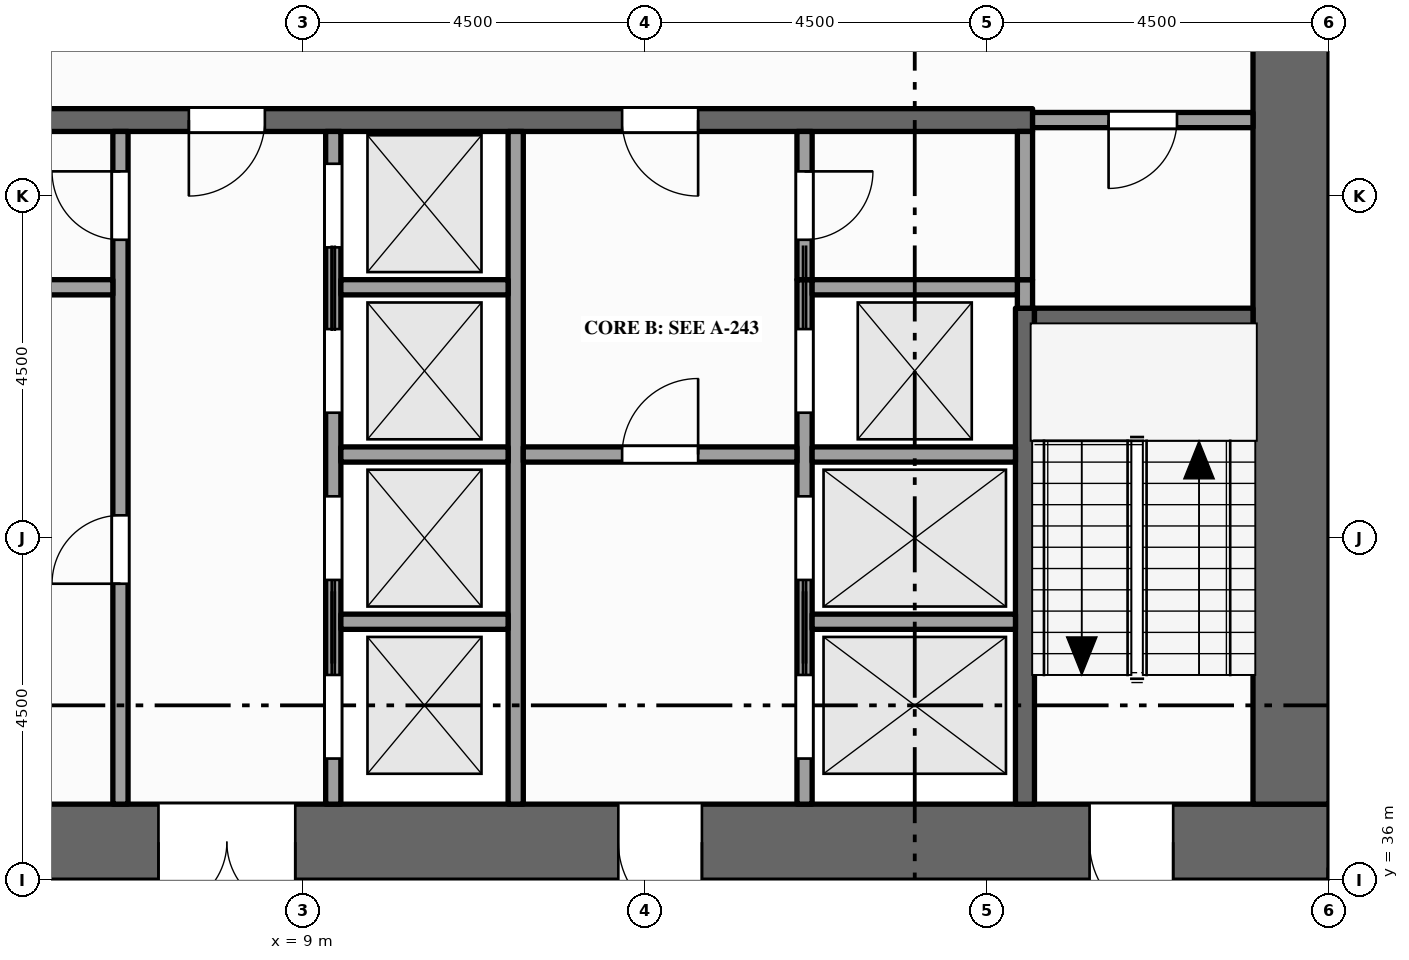
"""IFC4 building model, lengths in metres.
Left out: names, types, materials, properties, quantities, classifications, styles, units other than length and angle.
Written with IfcOpenShell. Run it as: python <this file> out.ifc"""

import sys

from ifc_helpers import new_model, si_unit, direction, frame, frame_2d, origin, place, context, subcontext, project, spatial, rectangle, extrude, element, fill, save


model = new_model("IFC4")
c1 = context("Model", 3, precision=1e-05, world=origin(), true_north=direction((0.0, 1.0)))
c2 = subcontext(c1, "Body", "Model", "MODEL_VIEW")
j1 = project(units=[si_unit("LENGTHUNIT", "METRE"), si_unit("PLANEANGLEUNIT", "RADIAN")], contexts=[c1])
p1 = place(None, origin())
s1 = spatial("IfcSite", under=j1, at=p1, CompositionType="ELEMENT")
p2 = place(p1, origin())
s2 = spatial("IfcBuilding", under=s1, at=p2, CompositionType="ELEMENT")
p3 = place(p2, frame((0.0, 0.0, 239.0)))
s3 = spatial("IfcBuildingStorey", under=s2, at=p3, CompositionType="ELEMENT", Elevation=239.0)
p4 = place(p3, frame((0.0, 36.5, -0.15), z_axis=(0.0, 0.0, 1.0), x_axis=(1.0, 0.0, 0.0)))
e1 = element("IfcWall", 1, at=p4, inside=s3, PredefinedType="SHEAR", context=c2, shape_type="SweptSolid", body=[
    extrude(rectangle(XDim=22.5, YDim=1.0, at=frame_2d((11.25, 0.0))), origin(), (0.0, 0.0, 1.0), 4.0),
])
p5 = place(p4, frame((7.1, 0.0, 0.15)))
e2 = element("IfcOpeningElement", 2, at=p5, cuts=e1, PredefinedType="OPENING", context=c2, shape_type="SweptSolid", body=[
    extrude(rectangle(XDim=1.8, YDim=2.1, at=frame_2d((0.9, 1.05))), frame((0.0, 0.51, 0.0), z_axis=(0.0, -1.0, 0.0), x_axis=(1.0, 0.0, 0.0)), (0.0, 0.0, 1.0), 1.02),
])
p6 = place(p4, frame((13.15, 0.0, 0.15)))
e3 = element("IfcOpeningElement", 3, at=p6, cuts=e1, PredefinedType="OPENING", context=c2, shape_type="SweptSolid", body=[
    extrude(rectangle(XDim=1.1, YDim=2.1, at=frame_2d((0.55, 1.05))), frame((0.0, 0.51, 0.0), z_axis=(0.0, -1.0, 0.0), x_axis=(1.0, 0.0, 0.0)), (0.0, 0.0, 1.0), 1.02),
])
p7 = place(p4, frame((2.15, 0.0, 0.15)))
e4 = element("IfcOpeningElement", 4, at=p7, cuts=e1, PredefinedType="OPENING", context=c2, shape_type="SweptSolid", body=[
    extrude(rectangle(XDim=1.1, YDim=2.1, at=frame_2d((0.55, 1.05))), frame((0.0, 0.51, 0.0), z_axis=(0.0, -1.0, 0.0), x_axis=(1.0, 0.0, 0.0)), (0.0, 0.0, 1.0), 1.02),
])
p8 = place(p4, frame((19.35, 0.0, 0.15)))
e5 = element("IfcOpeningElement", 5, at=p8, cuts=e1, PredefinedType="OPENING", context=c2, shape_type="SweptSolid", body=[
    extrude(rectangle(XDim=1.1, YDim=2.1, at=frame_2d((0.55, 1.05))), frame((0.0, 0.51, 0.0), z_axis=(0.0, -1.0, 0.0), x_axis=(1.0, 0.0, 0.0)), (0.0, 0.0, 1.0), 1.02),
])
p9 = place(p3, frame((22.0, 37.0, -0.15), z_axis=(0.0, 0.0, 1.0), x_axis=(0.0, 1.0, 0.0)))
e6 = element("IfcWall", 6, at=p9, inside=s3, PredefinedType="SHEAR", context=c2, shape_type="SweptSolid", body=[
    extrude(rectangle(XDim=11.5, YDim=1.0, at=frame_2d((5.75, 0.0))), origin(), (0.0, 0.0, 1.0), 4.0),
])
p10 = place(p3, frame((6.6, 37.0, 0.0), z_axis=(0.0, 0.0, 1.0), x_axis=(0.0, 1.0, 0.0)))
e7 = element("IfcWall", 7, at=p10, inside=s3, PredefinedType="PARTITIONING", context=c2, shape_type="SweptSolid", body=[
    extrude(rectangle(XDim=8.85, YDim=0.2, at=frame_2d((4.425, 0.0))), origin(), (0.0, 0.0, 1.0), 3.7),
])
p11 = place(p10, frame((2.9, 0.0, 0.0)))
e8 = element("IfcOpeningElement", 8, at=p11, cuts=e7, PredefinedType="OPENING", context=c2, shape_type="SweptSolid", body=[
    extrude(rectangle(XDim=0.9, YDim=2.1, at=frame_2d((0.45, 1.05))), frame((0.0, 0.11, 0.0), z_axis=(0.0, -1.0, 0.0), x_axis=(1.0, 0.0, 0.0)), (0.0, 0.0, 1.0), 0.22),
])
p12 = place(p10, frame((7.425, 0.0, 0.0)))
e9 = element("IfcOpeningElement", 9, at=p12, cuts=e7, PredefinedType="OPENING", context=c2, shape_type="SweptSolid", body=[
    extrude(rectangle(XDim=0.9, YDim=2.1, at=frame_2d((0.45, 1.05))), frame((0.0, 0.11, 0.0), z_axis=(0.0, -1.0, 0.0), x_axis=(1.0, 0.0, 0.0)), (0.0, 0.0, 1.0), 0.22),
])
p13 = place(p3, frame((9.4, 37.0, 0.0), z_axis=(0.0, 0.0, 1.0), x_axis=(0.0, 1.0, 0.0)))
e10 = element("IfcWall", 10, at=p13, inside=s3, PredefinedType="SOLIDWALL", context=c2, shape_type="SweptSolid", body=[
    extrude(rectangle(XDim=8.85, YDim=0.2, at=frame_2d((4.425, 0.0))), origin(), (0.0, 0.0, 1.0), 3.7),
])
p14 = place(p13, frame((0.6, 0.0, 0.012)))
e11 = element("IfcOpeningElement", 11, at=p14, cuts=e10, PredefinedType="OPENING", context=c2, shape_type="SweptSolid", body=[
    extrude(rectangle(XDim=1.1, YDim=2.1, at=frame_2d((0.55, 1.05))), frame((0.0, 0.11, 0.0), z_axis=(0.0, -1.0, 0.0), x_axis=(1.0, 0.0, 0.0)), (0.0, 0.0, 1.0), 0.22),
])
p15 = place(p13, frame((2.95, 0.0, 0.012)))
e12 = element("IfcOpeningElement", 12, at=p15, cuts=e10, PredefinedType="OPENING", context=c2, shape_type="SweptSolid", body=[
    extrude(rectangle(XDim=1.1, YDim=2.1, at=frame_2d((0.55, 1.05))), frame((0.0, 0.11, 0.0), z_axis=(0.0, -1.0, 0.0), x_axis=(1.0, 0.0, 0.0)), (0.0, 0.0, 1.0), 0.22),
])
p16 = place(p13, frame((5.15, 0.0, 0.012)))
e13 = element("IfcOpeningElement", 13, at=p16, cuts=e10, PredefinedType="OPENING", context=c2, shape_type="SweptSolid", body=[
    extrude(rectangle(XDim=1.1, YDim=2.1, at=frame_2d((0.55, 1.05))), frame((0.0, 0.11, 0.0), z_axis=(0.0, -1.0, 0.0), x_axis=(1.0, 0.0, 0.0)), (0.0, 0.0, 1.0), 0.22),
])
p17 = place(p13, frame((7.325, 0.0, 0.012)))
e14 = element("IfcOpeningElement", 14, at=p17, cuts=e10, PredefinedType="OPENING", context=c2, shape_type="SweptSolid", body=[
    extrude(rectangle(XDim=1.1, YDim=2.1, at=frame_2d((0.55, 1.05))), frame((0.0, 0.11, 0.0), z_axis=(0.0, -1.0, 0.0), x_axis=(1.0, 0.0, 0.0)), (0.0, 0.0, 1.0), 0.22),
])
p18 = place(p3, frame((11.8, 37.0, 0.0), z_axis=(0.0, 0.0, 1.0), x_axis=(0.0, 1.0, 0.0)))
e15 = element("IfcWall", 15, at=p18, inside=s3, PredefinedType="SOLIDWALL", context=c2, shape_type="SweptSolid", body=[
    extrude(rectangle(XDim=8.85, YDim=0.2, at=frame_2d((4.425, 0.0))), origin(), (0.0, 0.0, 1.0), 3.7),
])
p19 = place(p3, frame((15.6, 37.0, 0.0), z_axis=(0.0, 0.0, 1.0), x_axis=(0.0, 1.0, 0.0)))
e16 = element("IfcWall", 16, at=p19, inside=s3, PredefinedType="SOLIDWALL", context=c2, shape_type="SweptSolid", body=[
    extrude(rectangle(XDim=6.9, YDim=0.2, at=frame_2d((3.45, 0.0))), origin(), (0.0, 0.0, 1.0), 3.7),
])
p20 = place(p19, frame((0.6, 0.0, 0.012)))
e17 = element("IfcOpeningElement", 17, at=p20, cuts=e16, PredefinedType="OPENING", context=c2, shape_type="SweptSolid", body=[
    extrude(rectangle(XDim=1.1, YDim=2.1, at=frame_2d((0.55, 1.05))), frame((0.0, 0.11, 0.0), z_axis=(0.0, -1.0, 0.0), x_axis=(1.0, 0.0, 0.0)), (0.0, 0.0, 1.0), 0.22),
])
p21 = place(p19, frame((2.95, 0.0, 0.012)))
e18 = element("IfcOpeningElement", 18, at=p21, cuts=e16, PredefinedType="OPENING", context=c2, shape_type="SweptSolid", body=[
    extrude(rectangle(XDim=1.1, YDim=2.1, at=frame_2d((0.55, 1.05))), frame((0.0, 0.11, 0.0), z_axis=(0.0, -1.0, 0.0), x_axis=(1.0, 0.0, 0.0)), (0.0, 0.0, 1.0), 0.22),
])
p22 = place(p19, frame((5.15, 0.0, 0.012)))
e19 = element("IfcOpeningElement", 19, at=p22, cuts=e16, PredefinedType="OPENING", context=c2, shape_type="SweptSolid", body=[
    extrude(rectangle(XDim=1.1, YDim=2.1, at=frame_2d((0.55, 1.05))), frame((0.0, 0.11, 0.0), z_axis=(0.0, -1.0, 0.0), x_axis=(1.0, 0.0, 0.0)), (0.0, 0.0, 1.0), 0.22),
])
p23 = place(p3, frame((15.6, 43.9, 0.0), z_axis=(0.0, 0.0, 1.0), x_axis=(0.0, 1.0, 0.0)))
e20 = element("IfcWall", 20, at=p23, inside=s3, PredefinedType="PARTITIONING", context=c2, shape_type="SweptSolid", body=[
    extrude(rectangle(XDim=1.95, YDim=0.2, at=frame_2d((0.975, 0.0))), origin(), (0.0, 0.0, 1.0), 3.7),
])
p24 = place(p23, frame((0.525, 0.0, 0.0)))
e21 = element("IfcOpeningElement", 21, at=p24, cuts=e20, PredefinedType="OPENING", context=c2, shape_type="SweptSolid", body=[
    extrude(rectangle(XDim=0.9, YDim=2.1, at=frame_2d((0.45, 1.05))), frame((0.0, 0.11, 0.0), z_axis=(0.0, -1.0, 0.0), x_axis=(1.0, 0.0, 0.0)), (0.0, 0.0, 1.0), 0.22),
])
p25 = place(p3, frame((18.5, 37.0, 0.0), z_axis=(0.0, 0.0, 1.0), x_axis=(0.0, 1.0, 0.0)))
e22 = element("IfcWall", 22, at=p25, inside=s3, PredefinedType="SHEAR", context=c2, shape_type="SweptSolid", body=[
    extrude(rectangle(XDim=6.525, YDim=0.25, at=frame_2d((3.262, 0.0))), origin(), (0.0, 0.0, 1.0), 3.7),
])
p26 = place(p3, frame((18.5, 43.525, 0.0), z_axis=(0.0, 0.0, 1.0), x_axis=(0.0, 1.0, 0.0)))
e23 = element("IfcWall", 23, at=p26, inside=s3, PredefinedType="SOLIDWALL", context=c2, shape_type="SweptSolid", body=[
    extrude(rectangle(XDim=0.375, YDim=0.2, at=frame_2d((0.188, 0.0))), origin(), (0.0, 0.0, 1.0), 3.7),
])
p27 = place(p3, frame((18.5, 43.9, 0.0), z_axis=(0.0, 0.0, 1.0), x_axis=(0.0, 1.0, 0.0)))
e24 = element("IfcWall", 24, at=p27, inside=s3, PredefinedType="PARTITIONING", context=c2, shape_type="SweptSolid", body=[
    extrude(rectangle(XDim=1.95, YDim=0.2, at=frame_2d((0.975, 0.0))), origin(), (0.0, 0.0, 1.0), 3.7),
])
p28 = place(p3, frame((9.5, 39.4, 0.0), z_axis=(0.0, 0.0, 1.0), x_axis=(1.0, 0.0, 0.0)))
e25 = element("IfcWall", 25, at=p28, inside=s3, PredefinedType="SOLIDWALL", context=c2, shape_type="SweptSolid", body=[
    extrude(rectangle(XDim=2.2, YDim=0.2, at=frame_2d((1.1, 0.0))), origin(), (0.0, 0.0, 1.0), 3.7),
])
p29 = place(p3, frame((15.7, 39.4, 0.0), z_axis=(0.0, 0.0, 1.0), x_axis=(1.0, 0.0, 0.0)))
e26 = element("IfcWall", 26, at=p29, inside=s3, PredefinedType="SOLIDWALL", context=c2, shape_type="SweptSolid", body=[
    extrude(rectangle(XDim=2.675, YDim=0.2, at=frame_2d((1.337, 0.0))), origin(), (0.0, 0.0, 1.0), 3.7),
])
p30 = place(p3, frame((9.5, 41.6, 0.0), z_axis=(0.0, 0.0, 1.0), x_axis=(1.0, 0.0, 0.0)))
e27 = element("IfcWall", 27, at=p30, inside=s3, PredefinedType="SOLIDWALL", context=c2, shape_type="SweptSolid", body=[
    extrude(rectangle(XDim=2.2, YDim=0.2, at=frame_2d((1.1, 0.0))), origin(), (0.0, 0.0, 1.0), 3.7),
])
p31 = place(p3, frame((11.9, 41.6, 0.0), z_axis=(0.0, 0.0, 1.0), x_axis=(1.0, 0.0, 0.0)))
e28 = element("IfcWall", 28, at=p31, inside=s3, PredefinedType="PARTITIONING", context=c2, shape_type="SweptSolid", body=[
    extrude(rectangle(XDim=3.6, YDim=0.2, at=frame_2d((1.8, 0.0))), origin(), (0.0, 0.0, 1.0), 3.7),
])
p32 = place(p31, frame((1.3, 0.0, 0.0)))
e29 = element("IfcOpeningElement", 29, at=p32, cuts=e28, PredefinedType="OPENING", context=c2, shape_type="SweptSolid", body=[
    extrude(rectangle(XDim=1.0, YDim=2.1, at=frame_2d((0.5, 1.05))), frame((0.0, 0.11, 0.0), z_axis=(0.0, -1.0, 0.0), x_axis=(1.0, 0.0, 0.0)), (0.0, 0.0, 1.0), 0.22),
])
p33 = place(p3, frame((15.7, 41.6, 0.0), z_axis=(0.0, 0.0, 1.0), x_axis=(1.0, 0.0, 0.0)))
e30 = element("IfcWall", 30, at=p33, inside=s3, PredefinedType="SOLIDWALL", context=c2, shape_type="SweptSolid", body=[
    extrude(rectangle(XDim=2.675, YDim=0.2, at=frame_2d((1.337, 0.0))), origin(), (0.0, 0.0, 1.0), 3.7),
])
p34 = place(p3, frame((18.625, 43.4, 0.0), z_axis=(0.0, 0.0, 1.0), x_axis=(1.0, 0.0, 0.0)))
e31 = element("IfcWall", 31, at=p34, inside=s3, PredefinedType="SHEAR", context=c2, shape_type="SweptSolid", body=[
    extrude(rectangle(XDim=2.875, YDim=0.25, at=frame_2d((1.438, 0.0))), origin(), (0.0, 0.0, 1.0), 3.7),
])
p35 = place(p3, frame((4.3, 43.8, 0.0), z_axis=(0.0, 0.0, 1.0), x_axis=(1.0, 0.0, 0.0)))
e32 = element("IfcWall", 32, at=p35, inside=s3, PredefinedType="PARTITIONING", context=c2, shape_type="SweptSolid", body=[
    extrude(rectangle(XDim=2.2, YDim=0.2, at=frame_2d((1.1, 0.0))), origin(), (0.0, 0.0, 1.0), 3.7),
])
p36 = place(p3, frame((9.5, 43.8, 0.0), z_axis=(0.0, 0.0, 1.0), x_axis=(1.0, 0.0, 0.0)))
e33 = element("IfcWall", 33, at=p36, inside=s3, PredefinedType="SOLIDWALL", context=c2, shape_type="SweptSolid", body=[
    extrude(rectangle(XDim=2.2, YDim=0.2, at=frame_2d((1.1, 0.0))), origin(), (0.0, 0.0, 1.0), 3.7),
])
p37 = place(p3, frame((15.7, 43.8, 0.0), z_axis=(0.0, 0.0, 1.0), x_axis=(1.0, 0.0, 0.0)))
e34 = element("IfcWall", 34, at=p37, inside=s3, PredefinedType="SOLIDWALL", context=c2, shape_type="SweptSolid", body=[
    extrude(rectangle(XDim=2.7, YDim=0.2, at=frame_2d((1.35, 0.0))), origin(), (0.0, 0.0, 1.0), 3.7),
])
p38 = place(p3, frame((4.1, 46.0, 0.0), z_axis=(0.0, 0.0, 1.0), x_axis=(1.0, 0.0, 0.0)))
e35 = element("IfcWall", 35, at=p38, inside=s3, PredefinedType="SHEAR", context=c2, shape_type="SweptSolid", body=[
    extrude(rectangle(XDim=14.5, YDim=0.3, at=frame_2d((7.25, 0.0))), origin(), (0.0, 0.0, 1.0), 3.7),
])
p39 = place(p38, frame((3.4, 0.0, 0.0)))
e36 = element("IfcOpeningElement", 36, at=p39, cuts=e35, PredefinedType="OPENING", context=c2, shape_type="SweptSolid", body=[
    extrude(rectangle(XDim=1.0, YDim=2.1, at=frame_2d((0.5, 1.05))), frame((0.0, 0.16, 0.0), z_axis=(0.0, -1.0, 0.0), x_axis=(1.0, 0.0, 0.0)), (0.0, 0.0, 1.0), 0.32),
])
p40 = place(p38, frame((9.1, 0.0, 0.0)))
e37 = element("IfcOpeningElement", 37, at=p40, cuts=e35, PredefinedType="OPENING", context=c2, shape_type="SweptSolid", body=[
    extrude(rectangle(XDim=1.0, YDim=2.1, at=frame_2d((0.5, 1.05))), frame((0.0, 0.16, 0.0), z_axis=(0.0, -1.0, 0.0), x_axis=(1.0, 0.0, 0.0)), (0.0, 0.0, 1.0), 0.32),
])
p41 = place(p3, frame((18.6, 46.0, 0.0), z_axis=(0.0, 0.0, 1.0), x_axis=(1.0, 0.0, 0.0)))
e38 = element("IfcWall", 38, at=p41, inside=s3, PredefinedType="PARTITIONING", context=c2, shape_type="SweptSolid", body=[
    extrude(rectangle(XDim=2.9, YDim=0.2, at=frame_2d((1.45, 0.0))), origin(), (0.0, 0.0, 1.0), 3.7),
])
p42 = place(p41, frame((1.0, 0.0, 0.0)))
e39 = element("IfcOpeningElement", 39, at=p42, cuts=e38, PredefinedType="OPENING", context=c2, shape_type="SweptSolid", body=[
    extrude(rectangle(XDim=0.9, YDim=2.1, at=frame_2d((0.45, 1.05))), frame((0.0, 0.11, 0.0), z_axis=(0.0, -1.0, 0.0), x_axis=(1.0, 0.0, 0.0)), (0.0, 0.0, 1.0), 0.22),
])
p43 = place(p14, origin())
e40 = element("IfcDoor", 40, at=p43, inside=s3, OperationType="SLIDING_TO_RIGHT", PredefinedType="DOOR", context=c2, shape_type="SweptSolid", body=[
    extrude(rectangle(XDim=1.1, YDim=2.1, at=frame_2d((0.55, 1.05))), frame((0.0, 0.025, 0.0), z_axis=(0.0, -1.0, 0.0), x_axis=(1.0, 0.0, 0.0)), (0.0, 0.0, 1.0), 0.05),
])
fill(e11, e40)
p44 = place(p15, origin())
e41 = element("IfcDoor", 41, at=p44, inside=s3, OperationType="SLIDING_TO_LEFT", PredefinedType="DOOR", context=c2, shape_type="SweptSolid", body=[
    extrude(rectangle(XDim=1.1, YDim=2.1, at=frame_2d((0.55, 1.05))), frame((0.0, 0.025, 0.0), z_axis=(0.0, -1.0, 0.0), x_axis=(1.0, 0.0, 0.0)), (0.0, 0.0, 1.0), 0.05),
])
fill(e12, e41)
p45 = place(p16, origin())
e42 = element("IfcDoor", 42, at=p45, inside=s3, OperationType="SLIDING_TO_RIGHT", PredefinedType="DOOR", context=c2, shape_type="SweptSolid", body=[
    extrude(rectangle(XDim=1.1, YDim=2.1, at=frame_2d((0.55, 1.05))), frame((0.0, 0.025, 0.0), z_axis=(0.0, -1.0, 0.0), x_axis=(1.0, 0.0, 0.0)), (0.0, 0.0, 1.0), 0.05),
])
fill(e13, e42)
p46 = place(p17, origin())
e43 = element("IfcDoor", 43, at=p46, inside=s3, OperationType="SLIDING_TO_LEFT", PredefinedType="DOOR", context=c2, shape_type="SweptSolid", body=[
    extrude(rectangle(XDim=1.1, YDim=2.1, at=frame_2d((0.55, 1.05))), frame((0.0, 0.025, 0.0), z_axis=(0.0, -1.0, 0.0), x_axis=(1.0, 0.0, 0.0)), (0.0, 0.0, 1.0), 0.05),
])
fill(e14, e43)
p47 = place(p20, origin())
e44 = element("IfcDoor", 44, at=p47, inside=s3, OperationType="SLIDING_TO_RIGHT", PredefinedType="DOOR", context=c2, shape_type="SweptSolid", body=[
    extrude(rectangle(XDim=1.1, YDim=2.1, at=frame_2d((0.55, 1.05))), frame((0.0, 0.025, 0.0), z_axis=(0.0, -1.0, 0.0), x_axis=(1.0, 0.0, 0.0)), (0.0, 0.0, 1.0), 0.05),
])
fill(e17, e44)
p48 = place(p21, origin())
e45 = element("IfcDoor", 45, at=p48, inside=s3, OperationType="SLIDING_TO_LEFT", PredefinedType="DOOR", context=c2, shape_type="SweptSolid", body=[
    extrude(rectangle(XDim=1.1, YDim=2.1, at=frame_2d((0.55, 1.05))), frame((0.0, 0.025, 0.0), z_axis=(0.0, -1.0, 0.0), x_axis=(1.0, 0.0, 0.0)), (0.0, 0.0, 1.0), 0.05),
])
fill(e18, e45)
p49 = place(p22, origin())
e46 = element("IfcDoor", 46, at=p49, inside=s3, OperationType="SLIDING_TO_RIGHT", PredefinedType="DOOR", context=c2, shape_type="SweptSolid", body=[
    extrude(rectangle(XDim=1.1, YDim=2.1, at=frame_2d((0.55, 1.05))), frame((0.0, 0.025, 0.0), z_axis=(0.0, -1.0, 0.0), x_axis=(1.0, 0.0, 0.0)), (0.0, 0.0, 1.0), 0.05),
])
fill(e19, e46)
p50 = place(p5, origin())
e47 = element("IfcDoor", 47, at=p50, inside=s3, OperationType="DOUBLE_DOOR_SINGLE_SWING", PredefinedType="DOOR", context=c2, shape_type="SweptSolid", body=[
    extrude(rectangle(XDim=1.8, YDim=2.1, at=frame_2d((0.9, 1.05))), frame((0.0, 0.025, 0.0), z_axis=(0.0, -1.0, 0.0), x_axis=(1.0, 0.0, 0.0)), (0.0, 0.0, 1.0), 0.05),
])
fill(e2, e47)
p51 = place(p39, origin())
e48 = element("IfcDoor", 48, at=p51, inside=s3, OperationType="SINGLE_SWING_LEFT", PredefinedType="DOOR", context=c2, shape_type="SweptSolid", body=[
    extrude(rectangle(XDim=1.0, YDim=2.1, at=frame_2d((0.5, 1.05))), frame((0.0, 0.025, 0.0), z_axis=(0.0, -1.0, 0.0), x_axis=(1.0, 0.0, 0.0)), (0.0, 0.0, 1.0), 0.05),
])
fill(e36, e48)
p52 = place(p6, origin())
e49 = element("IfcDoor", 49, at=p52, inside=s3, OperationType="SINGLE_SWING_RIGHT", PredefinedType="DOOR", context=c2, shape_type="SweptSolid", body=[
    extrude(rectangle(XDim=1.1, YDim=2.1, at=frame_2d((0.55, 1.05))), frame((0.0, 0.025, 0.0), z_axis=(0.0, -1.0, 0.0), x_axis=(1.0, 0.0, 0.0)), (0.0, 0.0, 1.0), 0.05),
])
fill(e3, e49)
p53 = place(p32, origin())
e50 = element("IfcDoor", 50, at=p53, inside=s3, OperationType="SINGLE_SWING_RIGHT", PredefinedType="DOOR", context=c2, shape_type="SweptSolid", body=[
    extrude(rectangle(XDim=1.0, YDim=2.1, at=frame_2d((0.5, 1.05))), frame((0.0, 0.025, 0.0), z_axis=(0.0, -1.0, 0.0), x_axis=(1.0, 0.0, 0.0)), (0.0, 0.0, 1.0), 0.05),
])
fill(e29, e50)
p54 = place(p40, origin())
e51 = element("IfcDoor", 51, at=p54, inside=s3, OperationType="SINGLE_SWING_RIGHT", PredefinedType="DOOR", context=c2, shape_type="SweptSolid", body=[
    extrude(rectangle(XDim=1.0, YDim=2.1, at=frame_2d((0.5, 1.05))), frame((0.0, 0.025, 0.0), z_axis=(0.0, -1.0, 0.0), x_axis=(1.0, 0.0, 0.0)), (0.0, 0.0, 1.0), 0.05),
])
fill(e37, e51)
p55 = place(p8, origin())
e52 = element("IfcDoor", 52, at=p55, inside=s3, OperationType="SINGLE_SWING_RIGHT", PredefinedType="DOOR", context=c2, shape_type="SweptSolid", body=[
    extrude(rectangle(XDim=1.1, YDim=2.1, at=frame_2d((0.55, 1.05))), frame((0.0, 0.025, 0.0), z_axis=(0.0, -1.0, 0.0), x_axis=(1.0, 0.0, 0.0)), (0.0, 0.0, 1.0), 0.05),
])
fill(e5, e52)
p56 = place(p42, origin())
e53 = element("IfcDoor", 53, at=p56, inside=s3, OperationType="SINGLE_SWING_LEFT", PredefinedType="DOOR", context=c2, shape_type="SweptSolid", body=[
    extrude(rectangle(XDim=0.9, YDim=2.1, at=frame_2d((0.45, 1.05))), frame((0.0, 0.025, 0.0), z_axis=(0.0, -1.0, 0.0), x_axis=(1.0, 0.0, 0.0)), (0.0, 0.0, 1.0), 0.05),
])
fill(e39, e53)
p57 = place(p11, origin())
e54 = element("IfcDoor", 54, at=p57, inside=s3, OperationType="SINGLE_SWING_LEFT", PredefinedType="DOOR", context=c2, shape_type="SweptSolid", body=[
    extrude(rectangle(XDim=0.9, YDim=2.1, at=frame_2d((0.45, 1.05))), frame((0.0, 0.025, 0.0), z_axis=(0.0, -1.0, 0.0), x_axis=(1.0, 0.0, 0.0)), (0.0, 0.0, 1.0), 0.05),
])
fill(e8, e54)
p58 = place(p12, origin())
e55 = element("IfcDoor", 55, at=p58, inside=s3, OperationType="SINGLE_SWING_RIGHT", PredefinedType="DOOR", context=c2, shape_type="SweptSolid", body=[
    extrude(rectangle(XDim=0.9, YDim=2.1, at=frame_2d((0.45, 1.05))), frame((0.0, 0.025, 0.0), z_axis=(0.0, -1.0, 0.0), x_axis=(1.0, 0.0, 0.0)), (0.0, 0.0, 1.0), 0.05),
])
fill(e9, e55)
p59 = place(p24, origin())
e56 = element("IfcDoor", 56, at=p59, inside=s3, OperationType="SINGLE_SWING_RIGHT", PredefinedType="DOOR", context=c2, shape_type="SweptSolid", body=[
    extrude(rectangle(XDim=0.9, YDim=2.1, at=frame_2d((0.45, 1.05))), frame((0.0, 0.025, 0.0), z_axis=(0.0, -1.0, 0.0), x_axis=(1.0, 0.0, 0.0)), (0.0, 0.0, 1.0), 0.05),
])
fill(e21, e56)
save(model, sys.argv[1])
